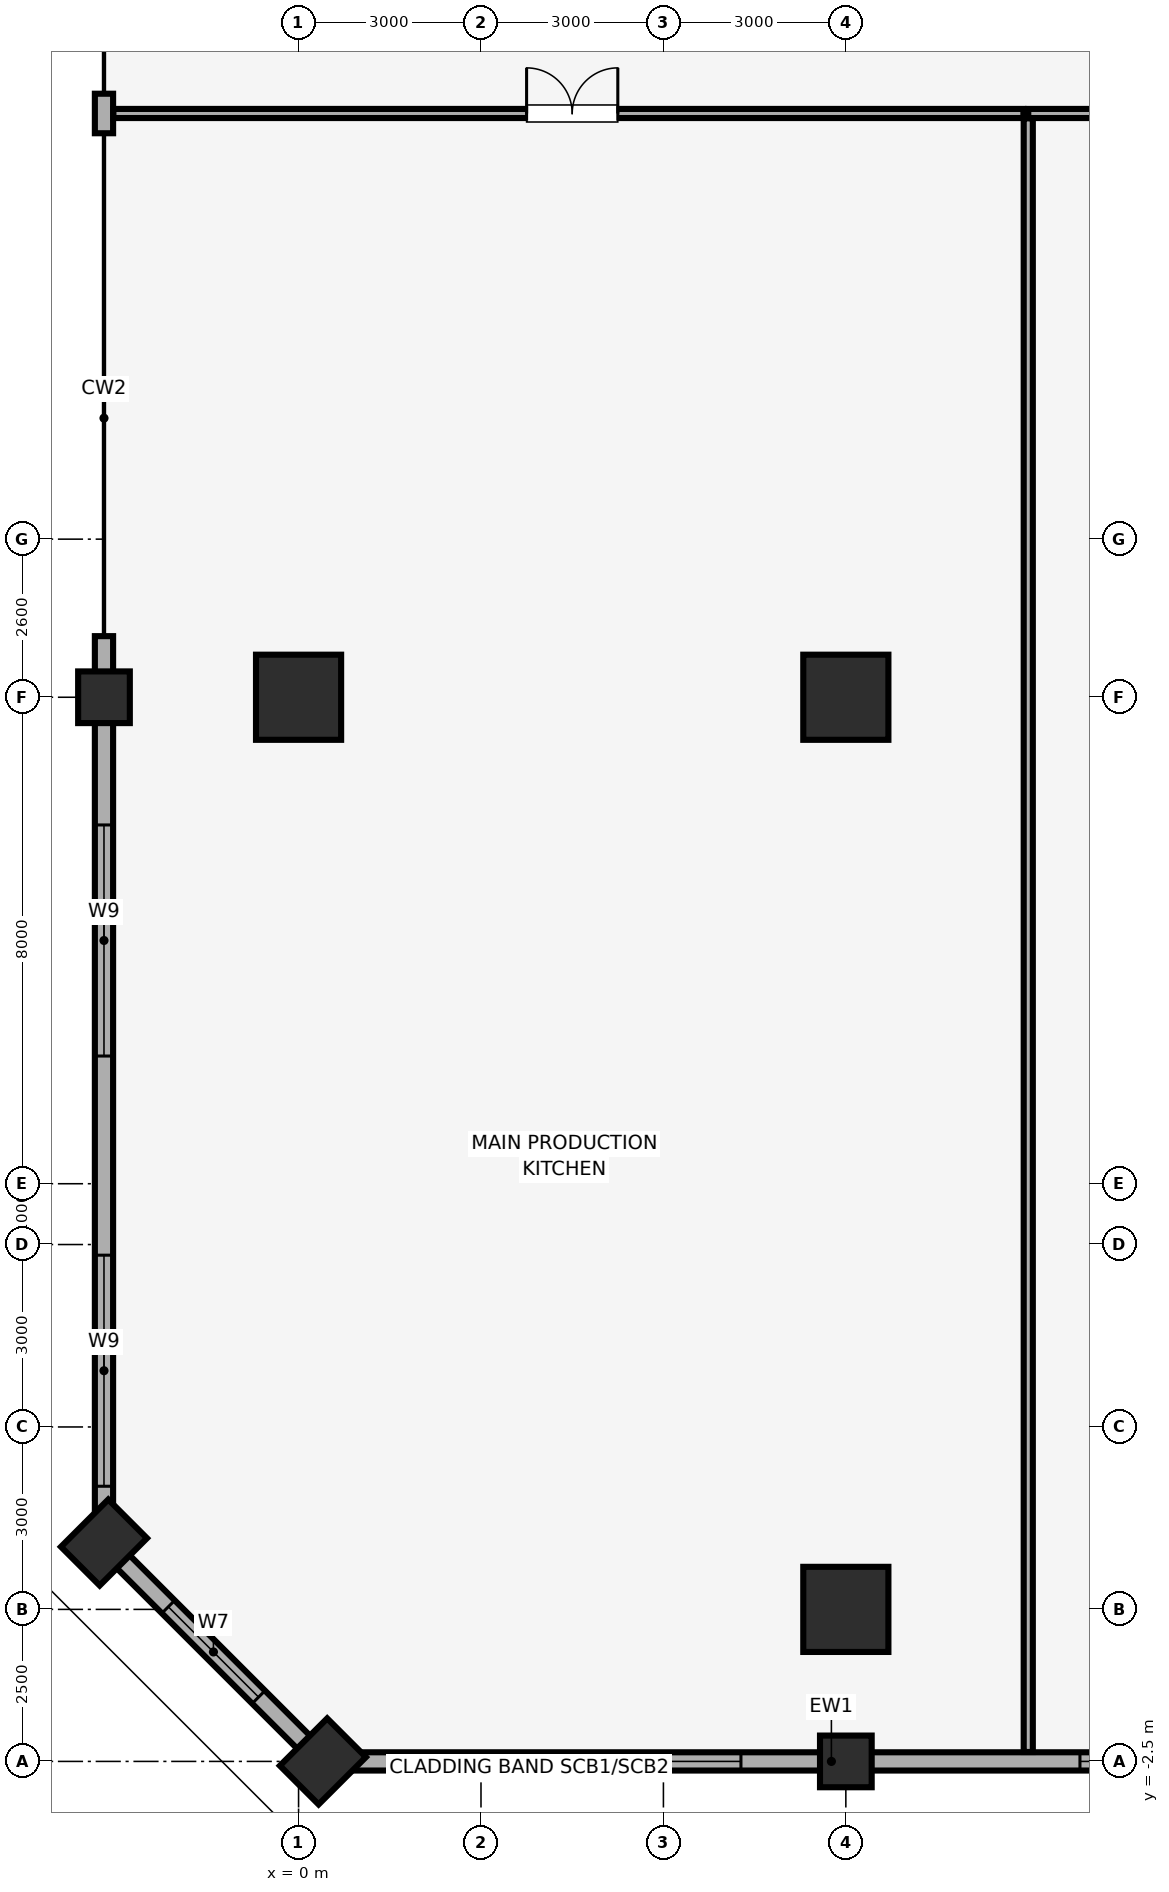
"""IFC4 building model, lengths in metres.
Left out: names, types, materials, properties, quantities, classifications, styles, units other than length and angle.
Written with IfcOpenShell. Run it as: python <this file> out.ifc"""

import sys

from ifc_helpers import new_model, si_unit, direction, frame, frame_2d, origin, origin_2d, place, context, subcontext, project, spatial, rectangle, extrude, element, fill, save


model = new_model("IFC4")
c1 = context("Model", 3, precision=1e-05, world=origin(), true_north=direction((0.0, 1.0)))
c2 = subcontext(c1, "Body", "Model", "MODEL_VIEW")
j1 = project(units=[si_unit("LENGTHUNIT", "METRE"), si_unit("PLANEANGLEUNIT", "RADIAN")], contexts=[c1])
p1 = place(None, origin())
s1 = spatial("IfcSite", under=j1, at=p1, CompositionType="ELEMENT")
p2 = place(p1, origin())
s2 = spatial("IfcBuilding", under=s1, at=p2, CompositionType="ELEMENT")
p3 = place(p2, frame((0.0, 0.0, 14.0)))
s3 = spatial("IfcBuildingStorey", under=s2, at=p3, CompositionType="ELEMENT", Elevation=14.0)
for number, where, z_axis, x_axis in (
    (1, (9.0, -2.5, 0.0), (0.0, 0.0, 1.0), (1.0, 0.0, 0.0)),
    (2, (-3.2, 15.0, 0.0), (0.0, 0.0, 1.0), (1.0, 0.0, 0.0)),
):
    element("IfcColumn", number, at=place(p3, frame(where, z_axis=z_axis, x_axis=x_axis)), inside=s3, PredefinedType="COLUMN", context=c2, shape_type="SweptSolid", body=[
        extrude(rectangle(XDim=0.85, YDim=0.85, at=origin_2d()), origin(), (0.0, 0.0, 1.0), 5.08),
    ])
for number, where, z_axis, x_axis in (
    (3, (0.4, -2.5, 0.0), (0.0, 0.0, 1.0), (0.707, 0.707, 0.0)),
    (4, (-3.2, 1.1, 0.0), (0.0, 0.0, 1.0), (0.707, 0.707, 0.0)),
):
    element("IfcColumn", number, at=place(p3, frame(where, z_axis=z_axis, x_axis=x_axis)), inside=s3, PredefinedType="PILASTER", context=c2, shape_type="SweptSolid", body=[
        extrude(rectangle(XDim=1.1, YDim=0.9, at=origin_2d()), origin(), (0.0, 0.0, 1.0), 5.08),
    ])
for number, where, z_axis, x_axis in (
    (5, (9.0, 0.0, 0.0), (0.0, 0.0, 1.0), (1.0, 0.0, 0.0)),
    (6, (9.0, 15.0, 0.0), (0.0, 0.0, 1.0), (1.0, 0.0, 0.0)),
    (7, (0.0, 15.0, 0.0), (0.0, 0.0, 1.0), (1.0, 0.0, 0.0)),
):
    element("IfcColumn", number, at=place(p3, frame(where, z_axis=z_axis, x_axis=x_axis)), inside=s3, PredefinedType="COLUMN", context=c2, shape_type="SweptSolid", body=[
        extrude(rectangle(XDim=1.4, YDim=1.4, at=origin_2d()), origin(), (0.0, 0.0, 1.0), 5.08),
    ])
p4 = place(p3, frame((0.4, -2.5, 0.0), z_axis=(0.0, 0.0, 1.0), x_axis=(1.0, 0.0, 0.0)))
e8 = element("IfcWall", 8, at=p4, inside=s3, PredefinedType="SOLIDWALL", context=c2, shape_type="SweptSolid", body=[
    extrude(rectangle(XDim=16.725, YDim=0.3, at=frame_2d((8.363, 0.0))), origin(), (0.0, 0.0, 1.0), 4.13),
])
p5 = place(p4, frame((1.475, 0.0, 0.85)))
e9 = element("IfcOpeningElement", 9, at=p5, cuts=e8, PredefinedType="OPENING", context=c2, shape_type="SweptSolid", body=[
    extrude(rectangle(XDim=5.4, YDim=2.4, at=frame_2d((2.7, 1.2))), frame((0.0, 0.16, 0.0), z_axis=(0.0, -1.0, 0.0), x_axis=(1.0, 0.0, 0.0)), (0.0, 0.0, 1.0), 0.32),
])
p6 = place(p4, frame((12.45, 0.0, 0.85)))
e10 = element("IfcOpeningElement", 10, at=p6, cuts=e8, PredefinedType="OPENING", context=c2, shape_type="SweptSolid", body=[
    extrude(rectangle(XDim=2.1, YDim=1.6, at=frame_2d((1.05, 0.8))), frame((0.0, 0.16, 0.0), z_axis=(0.0, -1.0, 0.0), x_axis=(1.0, 0.0, 0.0)), (0.0, 0.0, 1.0), 0.32),
])
p7 = place(p3, frame((-3.2, 24.925, 0.0), z_axis=(0.0, 0.0, 1.0), x_axis=(0.0, -1.0, 0.0)))
e11 = element("IfcWall", 11, at=p7, inside=s3, PredefinedType="SOLIDWALL", context=c2, shape_type="SweptSolid", body=[
    extrude(rectangle(XDim=0.65, YDim=0.3, at=frame_2d((0.325, 0.0))), origin(), (0.0, 0.0, 1.0), 4.13),
])
p8 = place(p3, frame((-3.2, 16.005, 0.0), z_axis=(0.0, 0.0, 1.0), x_axis=(0.0, -1.0, 0.0)))
e12 = element("IfcWall", 12, at=p8, inside=s3, PredefinedType="SOLIDWALL", context=c2, shape_type="SweptSolid", body=[
    extrude(rectangle(XDim=14.905, YDim=0.3, at=frame_2d((7.452, 0.0))), origin(), (0.0, 0.0, 1.0), 4.13),
])
p9 = place(p8, frame((10.18, 0.0, 0.85)))
e13 = element("IfcOpeningElement", 13, at=p9, cuts=e12, PredefinedType="OPENING", context=c2, shape_type="SweptSolid", body=[
    extrude(rectangle(XDim=3.8, YDim=2.2, at=frame_2d((1.9, 1.1))), frame((0.0, 0.16, 0.0), z_axis=(0.0, -1.0, 0.0), x_axis=(1.0, 0.0, 0.0)), (0.0, 0.0, 1.0), 0.32),
])
p10 = place(p8, frame((3.105, 0.0, 0.85)))
e14 = element("IfcOpeningElement", 14, at=p10, cuts=e12, PredefinedType="OPENING", context=c2, shape_type="SweptSolid", body=[
    extrude(rectangle(XDim=3.8, YDim=2.2, at=frame_2d((1.9, 1.1))), frame((0.0, 0.16, 0.0), z_axis=(0.0, -1.0, 0.0), x_axis=(1.0, 0.0, 0.0)), (0.0, 0.0, 1.0), 0.32),
])
p11 = place(p3, frame((-3.2, 1.1, 0.0), z_axis=(0.0, 0.0, 1.0), x_axis=(0.707082803744, -0.707130757816, 0.0)))
e15 = element("IfcWall", 15, at=p11, inside=s3, PredefinedType="SOLIDWALL", context=c2, shape_type="SweptSolid", body=[
    extrude(rectangle(XDim=5.091, YDim=0.3, at=frame_2d((2.545, 0.0))), origin(), (0.0, 0.0, 1.0), 4.13),
])
p12 = place(p11, frame((1.496, 0.0, 0.85)))
e16 = element("IfcOpeningElement", 16, at=p12, cuts=e15, PredefinedType="OPENING", context=c2, shape_type="SweptSolid", body=[
    extrude(rectangle(XDim=2.1, YDim=1.6, at=frame_2d((1.05, 0.8))), frame((0.0, 0.16, 0.0), z_axis=(0.0, -1.0, 0.0), x_axis=(1.0, 0.0, 0.0)), (0.0, 0.0, 1.0), 0.32),
])
p13 = place(p3, frame((12.0, 24.6, 0.0), z_axis=(0.0, 0.0, 1.0), x_axis=(1.0, 0.0, 0.0)))
e17 = element("IfcWall", 17, at=p13, inside=s3, PredefinedType="PARTITIONING", context=c2, shape_type="SweptSolid", body=[
    extrude(rectangle(XDim=29.0, YDim=0.15, at=frame_2d((14.5, 0.0))), origin(), (0.0, 0.0, 1.0), 5.08),
])
p14 = place(p13, frame((14.25, 0.0, 0.0)))
e18 = element("IfcOpeningElement", 18, at=p14, cuts=e17, PredefinedType="OPENING", context=c2, shape_type="SweptSolid", body=[
    extrude(rectangle(XDim=1.5, YDim=2.25, at=frame_2d((0.75, 1.125))), frame((0.0, 0.085, 0.0), z_axis=(0.0, -1.0, 0.0), x_axis=(1.0, 0.0, 0.0)), (0.0, 0.0, 1.0), 0.17),
])
p15 = place(p3, frame((12.0, -2.345, 0.0), z_axis=(0.0, 0.0, 1.0), x_axis=(0.0, 1.0, 0.0)))
e19 = element("IfcWall", 19, at=p15, inside=s3, PredefinedType="PARTITIONING", context=c2, shape_type="SweptSolid", body=[
    extrude(rectangle(XDim=26.865, YDim=0.15, at=frame_2d((13.433, 0.0))), origin(), (0.0, 0.0, 1.0), 5.08),
])
p16 = place(p3, frame((-3.045, 24.6, 0.0), z_axis=(0.0, 0.0, 1.0), x_axis=(1.0, 0.0, 0.0)))
e20 = element("IfcWall", 20, at=p16, inside=s3, PredefinedType="PARTITIONING", context=c2, shape_type="SweptSolid", body=[
    extrude(rectangle(XDim=14.965, YDim=0.15, at=frame_2d((7.482, 0.0))), origin(), (0.0, 0.0, 1.0), 5.08),
])
p17 = place(p16, frame((6.795, 0.0, 0.0)))
e21 = element("IfcOpeningElement", 21, at=p17, cuts=e20, PredefinedType="OPENING", context=c2, shape_type="SweptSolid", body=[
    extrude(rectangle(XDim=1.5, YDim=2.25, at=frame_2d((0.75, 1.125))), frame((0.0, 0.085, 0.0), z_axis=(0.0, -1.0, 0.0), x_axis=(1.0, 0.0, 0.0)), (0.0, 0.0, 1.0), 0.17),
])
p18 = place(p12, origin())
e22 = element("IfcWindow", 22, at=p18, inside=s3, PartitioningType="SINGLE_PANEL", PredefinedType="WINDOW", context=c2, shape_type="SweptSolid", body=[
    extrude(rectangle(XDim=2.1, YDim=1.6, at=frame_2d((1.05, 0.8))), frame((0.0, 0.03, 0.0), z_axis=(0.0, -1.0, 0.0), x_axis=(1.0, 0.0, 0.0)), (0.0, 0.0, 1.0), 0.06),
])
fill(e16, e22)
p19 = place(p5, origin())
e23 = element("IfcWindow", 23, at=p19, inside=s3, PartitioningType="SINGLE_PANEL", PredefinedType="WINDOW", context=c2, shape_type="SweptSolid", body=[
    extrude(rectangle(XDim=5.4, YDim=2.4, at=frame_2d((2.7, 1.2))), frame((0.0, 0.03, 0.0), z_axis=(0.0, -1.0, 0.0), x_axis=(1.0, 0.0, 0.0)), (0.0, 0.0, 1.0), 0.06),
])
fill(e9, e23)
p20 = place(p6, origin())
e24 = element("IfcWindow", 24, at=p20, inside=s3, PartitioningType="SINGLE_PANEL", PredefinedType="WINDOW", context=c2, shape_type="SweptSolid", body=[
    extrude(rectangle(XDim=2.1, YDim=1.6, at=frame_2d((1.05, 0.8))), frame((0.0, 0.03, 0.0), z_axis=(0.0, -1.0, 0.0), x_axis=(1.0, 0.0, 0.0)), (0.0, 0.0, 1.0), 0.06),
])
fill(e10, e24)
p21 = place(p9, origin())
e25 = element("IfcWindow", 25, at=p21, inside=s3, PartitioningType="SINGLE_PANEL", PredefinedType="WINDOW", context=c2, shape_type="SweptSolid", body=[
    extrude(rectangle(XDim=3.8, YDim=2.2, at=frame_2d((1.9, 1.1))), frame((0.0, 0.03, 0.0), z_axis=(0.0, -1.0, 0.0), x_axis=(1.0, 0.0, 0.0)), (0.0, 0.0, 1.0), 0.06),
])
fill(e13, e25)
p22 = place(p10, origin())
e26 = element("IfcWindow", 26, at=p22, inside=s3, PartitioningType="SINGLE_PANEL", PredefinedType="WINDOW", context=c2, shape_type="SweptSolid", body=[
    extrude(rectangle(XDim=3.8, YDim=2.2, at=frame_2d((1.9, 1.1))), frame((0.0, 0.03, 0.0), z_axis=(0.0, -1.0, 0.0), x_axis=(1.0, 0.0, 0.0)), (0.0, 0.0, 1.0), 0.06),
])
fill(e14, e26)
p23 = place(p17, origin())
e27 = element("IfcDoor", 27, at=p23, inside=s3, OperationType="DOUBLE_DOOR_SINGLE_SWING", PredefinedType="DOOR", context=c2, shape_type="SweptSolid", body=[
    extrude(rectangle(XDim=1.5, YDim=2.25, at=frame_2d((0.75, 1.125))), frame((0.0, 0.025, 0.0), z_axis=(0.0, -1.0, 0.0), x_axis=(1.0, 0.0, 0.0)), (0.0, 0.0, 1.0), 0.05),
])
fill(e21, e27)
save(model, sys.argv[1])
